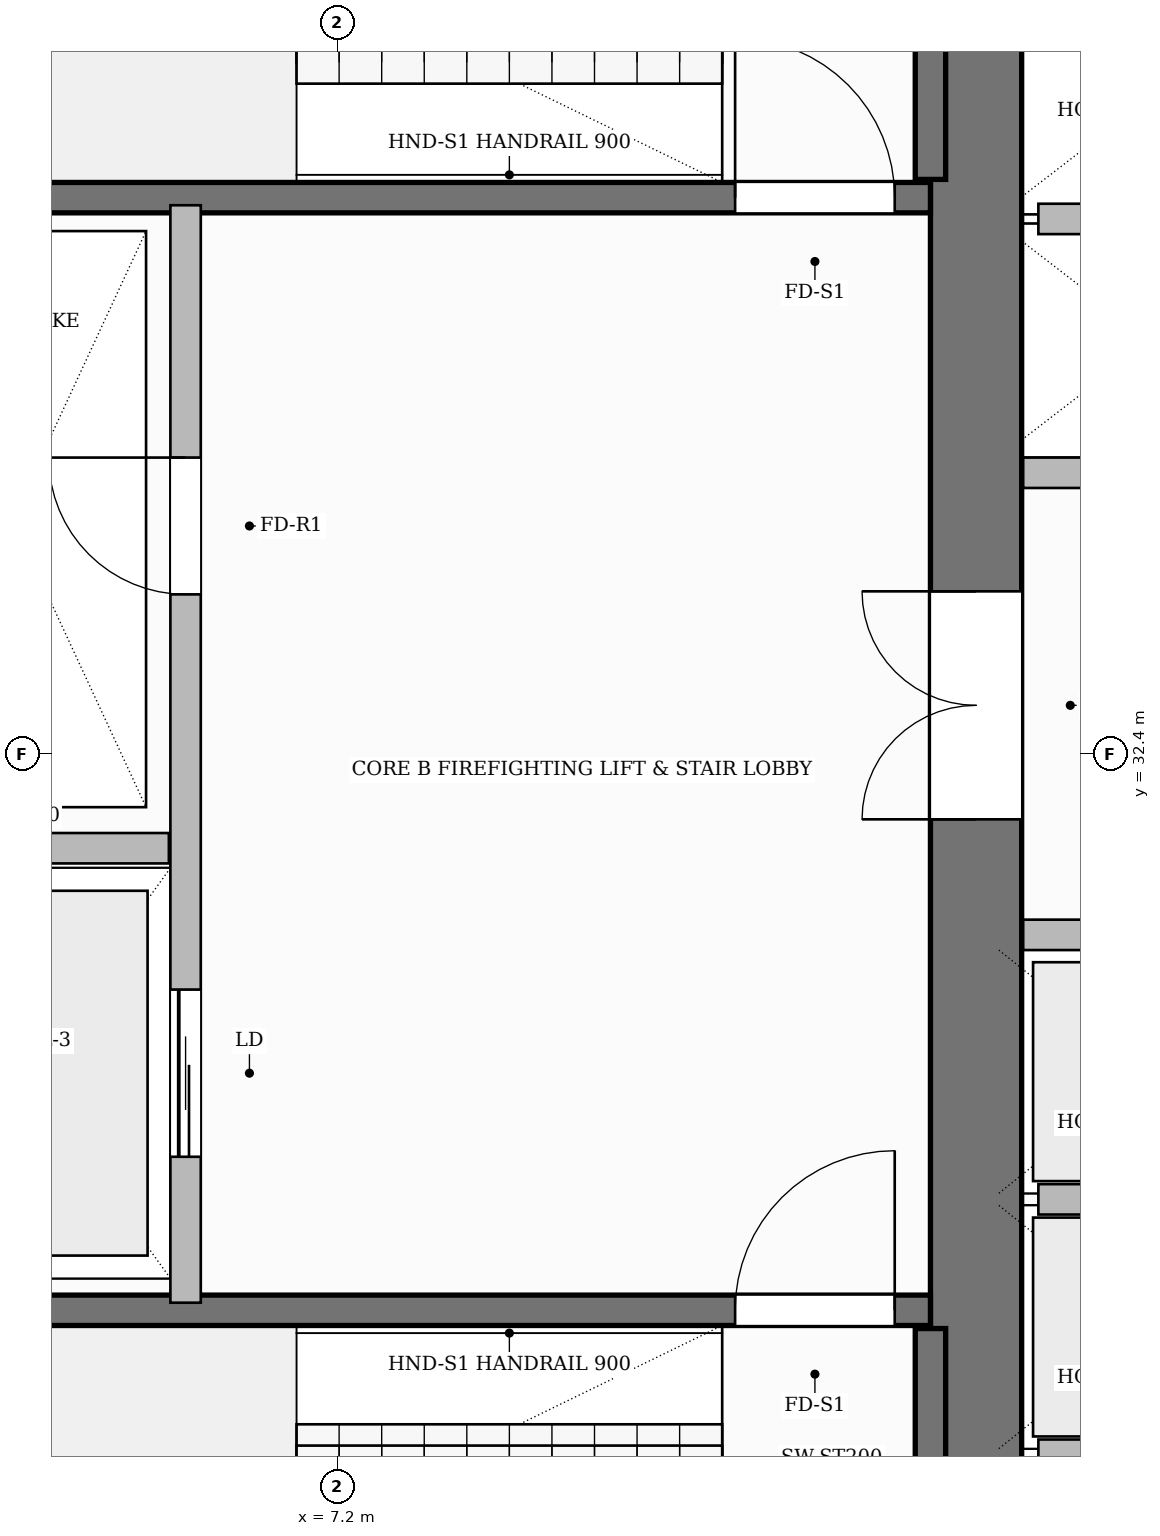
"""IFC4 building model, lengths in metres.
Left out: names, types, materials, properties, quantities, classifications, styles, units other than length and angle.
Written with IfcOpenShell. Run it as: python <this file> out.ifc"""

import sys

from ifc_helpers import new_model, si_unit, direction, frame, frame_2d, origin, place, context, subcontext, project, spatial, rectangle, extrude, source, transform, mapped, element, fill, save


model = new_model("IFC4")
c1 = context("Model", 3, precision=1e-05, world=origin(), true_north=direction((0.0, 1.0)))
c2 = subcontext(c1, "Body", "Model", "MODEL_VIEW")
j1 = project(units=[si_unit("LENGTHUNIT", "METRE"), si_unit("PLANEANGLEUNIT", "RADIAN")], contexts=[c1])
p1 = place(None, origin())
s1 = spatial("IfcSite", under=j1, at=p1, CompositionType="ELEMENT")
p2 = place(p1, origin())
s2 = spatial("IfcBuilding", under=s1, at=p2, CompositionType="ELEMENT")
p3 = place(p2, frame((0.0, 0.0, 32.4)))
s3 = spatial("IfcBuildingStorey", under=s2, at=p3, CompositionType="ELEMENT", Elevation=32.4)
p4 = place(p3, frame((11.4, 25.5, 0.0), z_axis=(0.0, 0.0, 1.0), x_axis=(0.0, 1.0, 0.0)))
e1 = element("IfcWall", 1, at=p4, inside=s3, PredefinedType="SHEAR", context=c2, shape_type="SweptSolid", body=[
    extrude(rectangle(XDim=13.8, YDim=0.6, at=frame_2d((6.9, 0.0))), origin(), (0.0, 0.0, 1.0), 3.7),
])
p5 = place(p4, frame((6.47, 0.0, 0.0)))
e2 = element("IfcOpeningElement", 2, at=p5, cuts=e1, PredefinedType="OPENING", context=c2, shape_type="SweptSolid", body=[
    extrude(rectangle(XDim=1.5, YDim=2.2, at=frame_2d((0.75, 1.1))), frame((0.0, 0.31, 0.0), z_axis=(0.0, -1.0, 0.0), x_axis=(1.0, 0.0, 0.0)), (0.0, 0.0, 1.0), 0.62),
])
p6 = place(p3, frame((11.1, 25.92, 0.0), z_axis=(0.0, 0.0, 1.0), x_axis=(0.0, 1.0, 0.0)))
e3 = element("IfcWall", 3, at=p6, inside=s3, PredefinedType="SHEAR", context=c2, shape_type="SweptSolid", body=[
    extrude(rectangle(XDim=2.7, YDim=0.2, at=frame_2d((1.35, 0.0))), origin(), (0.0, 0.0, 1.0), 3.7),
])
p7 = place(p3, frame((4.0, 28.74, 0.0), z_axis=(0.0, 0.0, 1.0), x_axis=(1.0, 0.0, 0.0)))
e4 = element("IfcWall", 4, at=p7, inside=s3, PredefinedType="SHEAR", context=c2, shape_type="SweptSolid", body=[
    extrude(rectangle(XDim=7.1, YDim=0.2, at=frame_2d((3.55, 0.0))), origin(), (0.0, 0.0, 1.0), 3.7),
])
p8 = place(p7, frame((5.815, 0.0, 0.0)))
e5 = element("IfcOpeningElement", 5, at=p8, cuts=e4, PredefinedType="OPENING", context=c2, shape_type="SweptSolid", body=[
    extrude(rectangle(XDim=1.05, YDim=2.2, at=frame_2d((0.525, 1.1))), frame((0.0, 0.11, 0.0), z_axis=(0.0, -1.0, 0.0), x_axis=(1.0, 0.0, 0.0)), (0.0, 0.0, 1.0), 0.22),
])
p9 = place(p3, frame((11.1, 36.18, 0.0), z_axis=(0.0, 0.0, 1.0), x_axis=(0.0, 1.0, 0.0)))
e6 = element("IfcWall", 6, at=p9, inside=s3, PredefinedType="SHEAR", context=c2, shape_type="SweptSolid", body=[
    extrude(rectangle(XDim=2.7, YDim=0.2, at=frame_2d((1.35, 0.0))), origin(), (0.0, 0.0, 1.0), 3.7),
])
p10 = place(p3, frame((4.0, 36.06, 0.0), z_axis=(0.0, 0.0, 1.0), x_axis=(1.0, 0.0, 0.0)))
e7 = element("IfcWall", 7, at=p10, inside=s3, PredefinedType="SHEAR", context=c2, shape_type="SweptSolid", body=[
    extrude(rectangle(XDim=7.1, YDim=0.2, at=frame_2d((3.55, 0.0))), origin(), (0.0, 0.0, 1.0), 3.7),
])
p11 = place(p10, frame((5.815, 0.0, 0.0)))
e8 = element("IfcOpeningElement", 8, at=p11, cuts=e7, PredefinedType="OPENING", context=c2, shape_type="SweptSolid", body=[
    extrude(rectangle(XDim=1.05, YDim=2.2, at=frame_2d((0.525, 1.1))), frame((0.0, 0.11, 0.0), z_axis=(0.0, -1.0, 0.0), x_axis=(1.0, 0.0, 0.0)), (0.0, 0.0, 1.0), 0.22),
])
p12 = place(p3, frame((6.2, 28.79, 0.0), z_axis=(0.0, 0.0, 1.0), x_axis=(0.0, 1.0, 0.0)))
e9 = element("IfcWall", 9, at=p12, inside=s3, PredefinedType="PARTITIONING", context=c2, shape_type="SweptSolid", body=[
    extrude(rectangle(XDim=7.22, YDim=0.2, at=frame_2d((3.61, 0.0))), origin(), (0.0, 0.0, 1.0), 3.45),
])
p13 = place(p12, frame((4.66, 0.0, 0.0)))
e10 = element("IfcOpeningElement", 10, at=p13, cuts=e9, PredefinedType="OPENING", context=c2, shape_type="SweptSolid", body=[
    extrude(rectangle(XDim=0.9, YDim=2.1, at=frame_2d((0.45, 1.05))), frame((0.0, 0.11, 0.0), z_axis=(0.0, -1.0, 0.0), x_axis=(1.0, 0.0, 0.0)), (0.0, 0.0, 1.0), 0.22),
])
p14 = place(p12, frame((0.96, 0.0, 0.0)))
e11 = element("IfcOpeningElement", 11, at=p14, cuts=e9, PredefinedType="OPENING", context=c2, shape_type="SweptSolid", body=[
    extrude(rectangle(XDim=1.1, YDim=2.2, at=frame_2d((0.55, 1.1))), frame((0.0, 0.11, 0.0), z_axis=(0.0, -1.0, 0.0), x_axis=(1.0, 0.0, 0.0)), (0.0, 0.0, 1.0), 0.22),
])
p15 = place(p3, frame((3.96, 31.78, 0.0), z_axis=(0.0, 0.0, 1.0), x_axis=(1.0, 0.0, 0.0)))
e12 = element("IfcWall", 12, at=p15, inside=s3, PredefinedType="PARTITIONING", context=c2, shape_type="SweptSolid", body=[
    extrude(rectangle(XDim=2.13, YDim=0.2, at=frame_2d((1.065, 0.0))), origin(), (0.0, 0.0, 1.0), 3.45),
])
p16 = place(p3, frame((11.71, 31.21, 0.0), z_axis=(0.0, 0.0, 1.0), x_axis=(1.0, 0.0, 0.0)))
e13 = element("IfcWall", 13, at=p16, inside=s3, PredefinedType="PARTITIONING", context=c2, shape_type="SweptSolid", body=[
    extrude(rectangle(XDim=1.96, YDim=0.2, at=frame_2d((0.98, 0.0))), origin(), (0.0, 0.0, 1.0), 3.45),
])
for number, where, z_axis, x_axis in (
    (14, (11.81, 27.79, 0.0), (0.0, 0.0, 1.0), (1.0, 0.0, 0.0)),
    (15, (11.81, 29.47, 0.0), (0.0, 0.0, 1.0), (1.0, 0.0, 0.0)),
):
    element("IfcWall", number, at=place(p3, frame(where, z_axis=z_axis, x_axis=x_axis)), inside=s3, PredefinedType="PARTITIONING", context=c2, shape_type="SweptSolid", body=[
        extrude(rectangle(XDim=1.76, YDim=0.2, at=frame_2d((0.88, 0.0))), origin(), (0.0, 0.0, 1.0), 3.45),
    ])
p17 = place(p3, frame((11.71, 34.25, 0.0), z_axis=(0.0, 0.0, 1.0), x_axis=(1.0, 0.0, 0.0)))
e16 = element("IfcWall", 16, at=p17, inside=s3, PredefinedType="PARTITIONING", context=c2, shape_type="SweptSolid", body=[
    extrude(rectangle(XDim=1.96, YDim=0.2, at=frame_2d((0.98, 0.0))), origin(), (0.0, 0.0, 1.0), 3.45),
])
p18 = place(p3, frame((11.81, 35.92, 0.0), z_axis=(0.0, 0.0, 1.0), x_axis=(1.0, 0.0, 0.0)))
e17 = element("IfcWall", 17, at=p18, inside=s3, PredefinedType="PARTITIONING", context=c2, shape_type="SweptSolid", body=[
    extrude(rectangle(XDim=1.76, YDim=0.2, at=frame_2d((0.88, 0.0))), origin(), (0.0, 0.0, 1.0), 3.45),
])
m1 = source(origin(), c2, "Body", "SweptSolid", [
    extrude(rectangle(XDim=1.05, YDim=2.2, at=frame_2d((0.525, 1.1))), frame((0.0, 0.025, 0.0), z_axis=(0.0, -1.0, 0.0), x_axis=(1.0, 0.0, 0.0)), (0.0, 0.0, 1.0), 0.05),
])
p19 = place(p8, origin())
e18 = element("IfcDoor", 18, at=p19, inside=s3, OperationType="SINGLE_SWING_LEFT", PredefinedType="DOOR", context=c2, shape_type="MappedRepresentation", body=[
    mapped(m1, transform((0.0, 0.0, 0.0), scale=1.0)),
])
fill(e5, e18)
p20 = place(p11, origin())
e19 = element("IfcDoor", 19, at=p20, inside=s3, OperationType="SINGLE_SWING_RIGHT", PredefinedType="DOOR", context=c2, shape_type="MappedRepresentation", body=[
    mapped(m1, transform((0.0, 0.0, 0.0), scale=1.0)),
])
fill(e8, e19)
m2 = source(origin(), c2, "Body", "SweptSolid", [
    extrude(rectangle(XDim=0.9, YDim=2.1, at=frame_2d((0.45, 1.05))), frame((0.0, 0.025, 0.0), z_axis=(0.0, -1.0, 0.0), x_axis=(1.0, 0.0, 0.0)), (0.0, 0.0, 1.0), 0.05),
])
p21 = place(p13, origin())
e20 = element("IfcDoor", 20, at=p21, inside=s3, OperationType="SINGLE_SWING_LEFT", PredefinedType="DOOR", context=c2, shape_type="MappedRepresentation", body=[
    mapped(m2, transform((0.0, 0.0, 0.0), scale=1.0)),
])
fill(e10, e20)
m3 = source(origin(), c2, "Body", "SweptSolid", [
    extrude(rectangle(XDim=1.5, YDim=2.2, at=frame_2d((0.75, 1.1))), frame((0.0, 0.025, 0.0), z_axis=(0.0, -1.0, 0.0), x_axis=(1.0, 0.0, 0.0)), (0.0, 0.0, 1.0), 0.05),
])
p22 = place(p5, origin())
e21 = element("IfcDoor", 21, at=p22, inside=s3, OperationType="DOUBLE_DOOR_SINGLE_SWING", PredefinedType="DOOR", context=c2, shape_type="MappedRepresentation", body=[
    mapped(m3, transform((0.0, 0.0, 0.0), scale=1.0)),
])
fill(e2, e21)
m4 = source(origin(), c2, "Body", "SweptSolid", [
    extrude(rectangle(XDim=1.1, YDim=2.2, at=frame_2d((0.55, 1.1))), frame((0.0, 0.025, 0.0), z_axis=(0.0, -1.0, 0.0), x_axis=(1.0, 0.0, 0.0)), (0.0, 0.0, 1.0), 0.05),
])
p23 = place(p14, origin())
e22 = element("IfcDoor", 22, at=p23, inside=s3, OperationType="SLIDING_TO_LEFT", PredefinedType="DOOR", context=c2, shape_type="MappedRepresentation", body=[
    mapped(m4, transform((0.0, 0.0, 0.0), scale=1.0)),
])
fill(e11, e22)
save(model, sys.argv[1])
